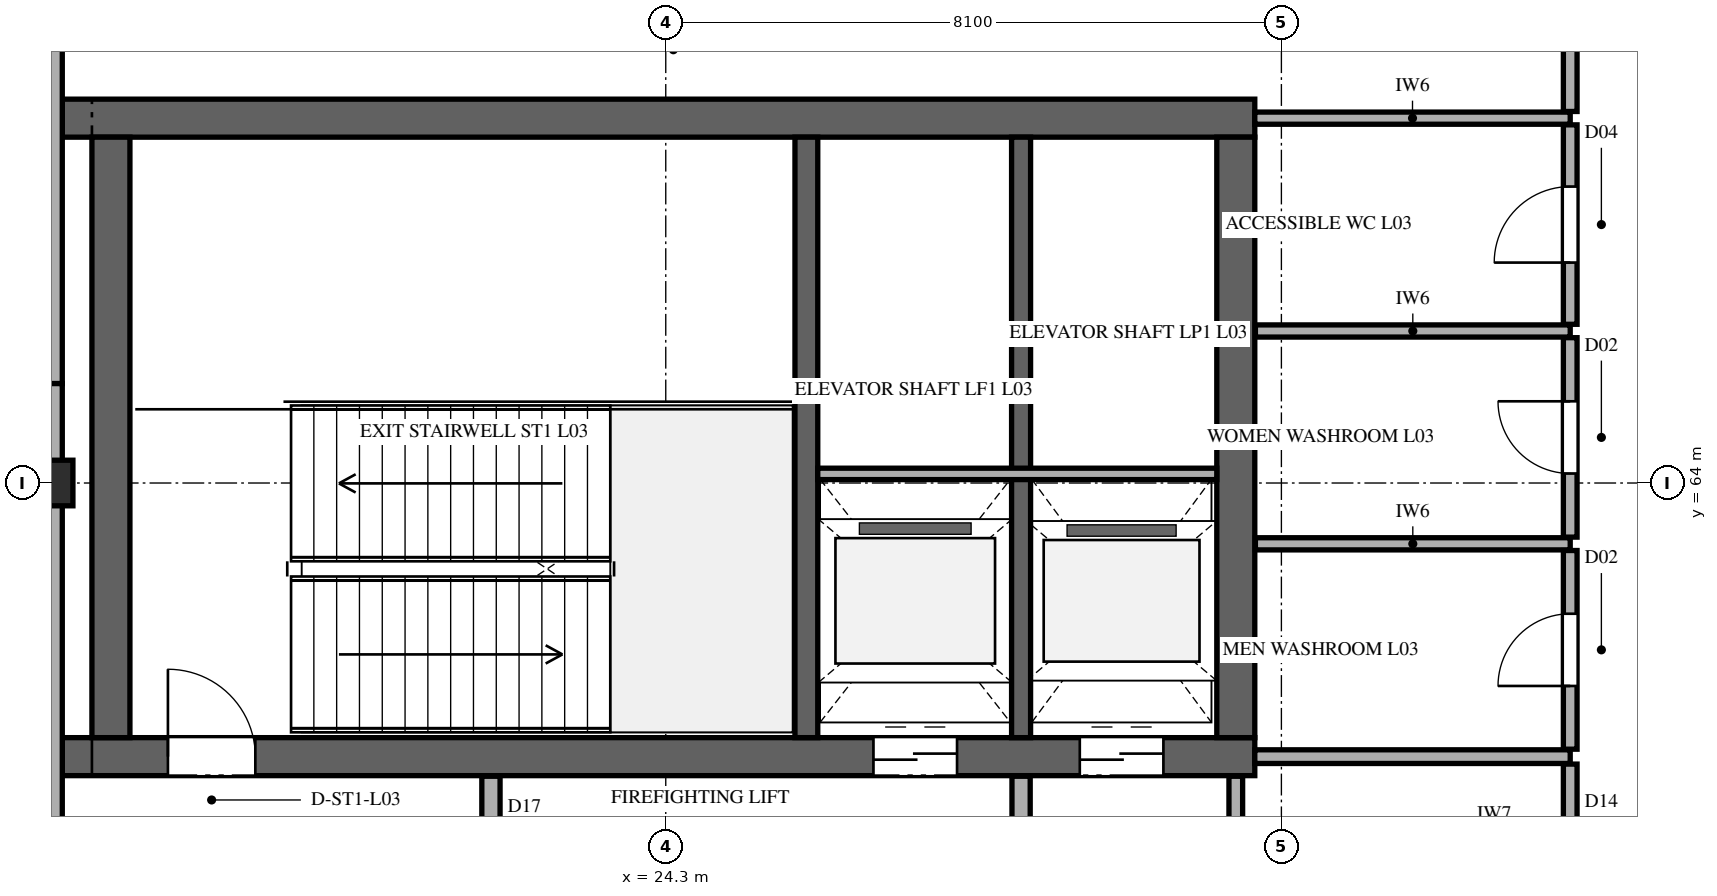
"""IFC4 building model, lengths in metres.
Left out: names, types, materials, properties, quantities, classifications, styles, units other than length and angle.
Written with IfcOpenShell. Run it as: python <this file> out.ifc"""

import sys

from ifc_helpers import new_model, si_unit, direction, frame, frame_2d, origin, origin_2d, place, context, subcontext, project, spatial, rectangle, extrude, element, fill, save


model = new_model("IFC4")
c1 = context("Model", 3, precision=1e-05, world=origin(), true_north=direction((0.0, 1.0)))
c2 = subcontext(c1, "Body", "Model", "MODEL_VIEW")
j1 = project(units=[si_unit("LENGTHUNIT", "METRE"), si_unit("PLANEANGLEUNIT", "RADIAN")], contexts=[c1])
p1 = place(None, origin())
s1 = spatial("IfcSite", under=j1, at=p1, CompositionType="ELEMENT")
p2 = place(p1, origin())
s2 = spatial("IfcBuilding", under=s1, at=p2, CompositionType="ELEMENT")
p3 = place(p2, frame((0.0, 0.0, 14.7)))
s3 = spatial("IfcBuildingStorey", under=s2, at=p3, CompositionType="ELEMENT", Elevation=14.7)
p4 = place(p3, frame((16.36, 60.4, 0.0), z_axis=(0.0, 0.0, 1.0), x_axis=(1.0, 0.0, 0.0)))
e1 = element("IfcWall", 1, at=p4, inside=s3, PredefinedType="SHEAR", context=c2, shape_type="SweptSolid", body=[
    extrude(rectangle(XDim=15.69, YDim=0.5, at=frame_2d((7.845, 0.0))), origin(), (0.0, 0.0, 1.0), 5.1),
])
p5 = place(p4, frame((1.39, 0.0, 0.0)))
e2 = element("IfcOpeningElement", 2, at=p5, cuts=e1, PredefinedType="OPENING", context=c2, shape_type="SweptSolid", body=[
    extrude(rectangle(XDim=1.15, YDim=2.25, at=frame_2d((0.575, 1.125))), frame((0.0, 0.26, 0.0), z_axis=(0.0, -1.0, 0.0), x_axis=(1.0, 0.0, 0.0)), (0.0, 0.0, 1.0), 0.52),
])
p6 = place(p4, frame((10.673, 0.0, 0.0)))
e3 = element("IfcOpeningElement", 3, at=p6, cuts=e1, PredefinedType="OPENING", context=c2, shape_type="SweptSolid", body=[
    extrude(rectangle(XDim=1.1, YDim=2.2, at=frame_2d((0.55, 1.1))), frame((0.0, 0.26, 0.0), z_axis=(0.0, -1.0, 0.0), x_axis=(1.0, 0.0, 0.0)), (0.0, 0.0, 1.0), 0.52),
])
p7 = place(p4, frame((13.387, 0.0, 0.0)))
e4 = element("IfcOpeningElement", 4, at=p7, cuts=e1, PredefinedType="OPENING", context=c2, shape_type="SweptSolid", body=[
    extrude(rectangle(XDim=1.1, YDim=2.2, at=frame_2d((0.55, 1.1))), frame((0.0, 0.26, 0.0), z_axis=(0.0, -1.0, 0.0), x_axis=(1.0, 0.0, 0.0)), (0.0, 0.0, 1.0), 0.52),
])
p8 = place(p3, frame((16.36, 68.8, 0.0), z_axis=(0.0, 0.0, 1.0), x_axis=(1.0, 0.0, 0.0)))
e5 = element("IfcWall", 5, at=p8, inside=s3, PredefinedType="SHEAR", context=c2, shape_type="SweptSolid", body=[
    extrude(rectangle(XDim=15.69, YDim=0.5, at=frame_2d((7.845, 0.0))), origin(), (0.0, 0.0, 1.0), 5.1),
])
for number, where, z_axis, x_axis in (
    (6, (17.0, 60.65, 0.0), (0.0, 0.0, 1.0), (0.0, 1.0, 0.0)),
    (7, (31.8, 60.65, 0.0), (0.0, 0.0, 1.0), (0.0, 1.0, 0.0)),
):
    element("IfcWall", number, at=place(p3, frame(where, z_axis=z_axis, x_axis=x_axis)), inside=s3, PredefinedType="SHEAR", context=c2, shape_type="SweptSolid", body=[
        extrude(rectangle(XDim=7.9, YDim=0.5, at=frame_2d((3.95, 0.0))), origin(), (0.0, 0.0, 1.0), 5.1),
    ])
p9 = place(p3, frame((26.15, 60.65, 0.0), z_axis=(0.0, 0.0, 1.0), x_axis=(0.0, 1.0, 0.0)))
e8 = element("IfcWall", 8, at=p9, inside=s3, PredefinedType="SHEAR", context=c2, shape_type="SweptSolid", body=[
    extrude(rectangle(XDim=7.9, YDim=0.3, at=frame_2d((3.95, 0.0))), origin(), (0.0, 0.0, 1.0), 5.1),
])
p10 = place(p3, frame((28.975, 60.65, 0.0), z_axis=(0.0, 0.0, 1.0), x_axis=(0.0, 1.0, 0.0)))
e9 = element("IfcWall", 9, at=p10, inside=s3, PredefinedType="SHEAR", context=c2, shape_type="SweptSolid", body=[
    extrude(rectangle(XDim=7.9, YDim=0.25, at=frame_2d((3.95, 0.0))), origin(), (0.0, 0.0, 1.0), 5.1),
])
p11 = place(p3, frame((16.2, 64.0, 0.0), z_axis=(0.0, 0.0, 1.0), x_axis=(1.0, 0.0, 0.0)))
e10 = element("IfcColumn", 10, at=p11, inside=s3, PredefinedType="COLUMN", context=c2, shape_type="SweptSolid", body=[
    extrude(rectangle(XDim=0.6, YDim=0.6, at=origin_2d()), origin(), (0.0, 0.0, 1.0), 5.1),
])
p12 = place(p3, frame((16.2, 80.872, 0.0), z_axis=(0.0, 0.0, 1.0), x_axis=(0.0, -1.0, 0.0)))
e11 = element("IfcWall", 11, at=p12, inside=s3, PredefinedType="SOLIDWALL", context=c2, shape_type="SweptSolid", body=[
    extrude(rectangle(XDim=15.564, YDim=0.32, at=frame_2d((7.782, 0.0))), origin(), (0.0, 0.0, 1.0), 4.332),
])
p13 = place(p12, frame((3.6, 0.0, 0.95)))
e12 = element("IfcOpeningElement", 12, at=p13, cuts=e11, PredefinedType="OPENING", context=c2, shape_type="SweptSolid", body=[
    extrude(rectangle(XDim=3.6, YDim=1.8, at=frame_2d((1.8, 0.9))), frame((0.0, 0.17, 0.0), z_axis=(0.0, -1.0, 0.0), x_axis=(1.0, 0.0, 0.0)), (0.0, 0.0, 1.0), 0.34),
])
p14 = place(p3, frame((16.2, 65.308, 0.0), z_axis=(0.0, 0.0, 1.0), x_axis=(0.0, -1.0, 0.0)))
e13 = element("IfcWall", 13, at=p14, inside=s3, PredefinedType="SOLIDWALL", context=c2, shape_type="SweptSolid", body=[
    extrude(rectangle(XDim=15.564, YDim=0.32, at=frame_2d((7.782, 0.0))), origin(), (0.0, 0.0, 1.0), 4.332),
])
p15 = place(p3, frame((26.3, 64.12, 0.0), z_axis=(0.0, 0.0, 1.0), x_axis=(1.0, 0.0, 0.0)))
e14 = element("IfcWall", 14, at=p15, inside=s3, PredefinedType="PARTITIONING", context=c2, shape_type="SweptSolid", body=[
    extrude(rectangle(XDim=5.25, YDim=0.15, at=frame_2d((2.625, 0.0))), origin(), (0.0, 0.0, 1.0), 4.84),
])
p16 = place(p3, frame((32.05, 60.4, 0.0), z_axis=(0.0, 0.0, 1.0), x_axis=(1.0, 0.0, 0.0)))
e15 = element("IfcWall", 15, at=p16, inside=s3, PredefinedType="PARTITIONING", context=c2, shape_type="SweptSolid", body=[
    extrude(rectangle(XDim=4.15, YDim=0.18, at=frame_2d((2.075, 0.0))), origin(), (0.0, 0.0, 1.0), 4.84),
])
for number, where, z_axis, x_axis in (
    (16, (32.058, 63.2, 0.0), (0.0, 0.0, 1.0), (1.0, 0.0, 0.0)),
    (17, (32.058, 66.0, 0.0), (0.0, 0.0, 1.0), (1.0, 0.0, 0.0)),
):
    element("IfcWall", number, at=place(p3, frame(where, z_axis=z_axis, x_axis=x_axis)), inside=s3, PredefinedType="PARTITIONING", context=c2, shape_type="SweptSolid", body=[
        extrude(rectangle(XDim=4.142, YDim=0.16, at=frame_2d((2.071, 0.0))), origin(), (0.0, 0.0, 1.0), 4.84),
    ])
p17 = place(p3, frame((32.05, 68.8, 0.0), z_axis=(0.0, 0.0, 1.0), x_axis=(1.0, 0.0, 0.0)))
e18 = element("IfcWall", 18, at=p17, inside=s3, PredefinedType="PARTITIONING", context=c2, shape_type="SweptSolid", body=[
    extrude(rectangle(XDim=4.15, YDim=0.16, at=frame_2d((2.075, 0.0))), origin(), (0.0, 0.0, 1.0), 4.84),
])
p18 = place(p3, frame((22.0, 56.928, 0.0), z_axis=(0.0, 0.0, 1.0), x_axis=(0.0, 1.0, 0.0)))
e19 = element("IfcWall", 19, at=p18, inside=s3, PredefinedType="PARTITIONING", context=c2, shape_type="SweptSolid", body=[
    extrude(rectangle(XDim=3.214, YDim=0.24, at=frame_2d((1.607, 0.0))), origin(), (0.0, 0.0, 1.0), 4.84),
])
p19 = place(p18, frame((1.107, 0.0, 0.0)))
e20 = element("IfcOpeningElement", 20, at=p19, cuts=e19, PredefinedType="OPENING", context=c2, shape_type="SweptSolid", body=[
    extrude(rectangle(XDim=1.0, YDim=2.2, at=frame_2d((0.5, 1.1))), frame((0.0, 0.13, 0.0), z_axis=(0.0, -1.0, 0.0), x_axis=(1.0, 0.0, 0.0)), (0.0, 0.0, 1.0), 0.26),
])
p20 = place(p3, frame((28.975, 56.928, 0.0), z_axis=(0.0, 0.0, 1.0), x_axis=(0.0, 1.0, 0.0)))
e21 = element("IfcWall", 21, at=p20, inside=s3, PredefinedType="PARTITIONING", context=c2, shape_type="SweptSolid", body=[
    extrude(rectangle(XDim=3.214, YDim=0.24, at=frame_2d((1.607, 0.0))), origin(), (0.0, 0.0, 1.0), 4.84),
])
p21 = place(p3, frame((31.8, 56.898, 0.0), z_axis=(0.0, 0.0, 1.0), x_axis=(0.0, 1.0, 0.0)))
e22 = element("IfcWall", 22, at=p21, inside=s3, PredefinedType="PARTITIONING", context=c2, shape_type="SweptSolid", body=[
    extrude(rectangle(XDim=3.244, YDim=0.18, at=frame_2d((1.622, 0.0))), origin(), (0.0, 0.0, 1.0), 4.84),
])
p22 = place(p3, frame((36.2, 56.898, 0.0), z_axis=(0.0, 0.0, 1.0), x_axis=(0.0, 1.0, 0.0)))
e23 = element("IfcWall", 23, at=p22, inside=s3, PredefinedType="PARTITIONING", context=c2, shape_type="SweptSolid", body=[
    extrude(rectangle(XDim=3.404, YDim=0.18, at=frame_2d((1.702, 0.0))), origin(), (0.0, 0.0, 1.0), 4.84),
])
p23 = place(p22, frame((1.202, 0.0, 0.0)))
e24 = element("IfcOpeningElement", 24, at=p23, cuts=e23, PredefinedType="OPENING", context=c2, shape_type="SweptSolid", body=[
    extrude(rectangle(XDim=1.0, YDim=2.15, at=frame_2d((0.5, 1.075))), frame((0.0, 0.1, 0.0), z_axis=(0.0, -1.0, 0.0), x_axis=(1.0, 0.0, 0.0)), (0.0, 0.0, 1.0), 0.2),
])
p24 = place(p3, frame((36.2, 60.498, 0.0), z_axis=(0.0, 0.0, 1.0), x_axis=(0.0, 1.0, 0.0)))
e25 = element("IfcWall", 25, at=p24, inside=s3, PredefinedType="PARTITIONING", context=c2, shape_type="SweptSolid", body=[
    extrude(rectangle(XDim=2.614, YDim=0.18, at=frame_2d((1.307, 0.0))), origin(), (0.0, 0.0, 1.0), 4.84),
])
p25 = place(p24, frame((0.832, 0.0, 0.0)))
e26 = element("IfcOpeningElement", 26, at=p25, cuts=e25, PredefinedType="OPENING", context=c2, shape_type="SweptSolid", body=[
    extrude(rectangle(XDim=0.95, YDim=2.1, at=frame_2d((0.475, 1.05))), frame((0.0, 0.1, 0.0), z_axis=(0.0, -1.0, 0.0), x_axis=(1.0, 0.0, 0.0)), (0.0, 0.0, 1.0), 0.2),
])
p26 = place(p3, frame((36.2, 63.288, 0.0), z_axis=(0.0, 0.0, 1.0), x_axis=(0.0, 1.0, 0.0)))
e27 = element("IfcWall", 27, at=p26, inside=s3, PredefinedType="PARTITIONING", context=c2, shape_type="SweptSolid", body=[
    extrude(rectangle(XDim=2.624, YDim=0.18, at=frame_2d((1.312, 0.0))), origin(), (0.0, 0.0, 1.0), 4.84),
])
p27 = place(p26, frame((0.837, 0.0, 0.0)))
e28 = element("IfcOpeningElement", 28, at=p27, cuts=e27, PredefinedType="OPENING", context=c2, shape_type="SweptSolid", body=[
    extrude(rectangle(XDim=0.95, YDim=2.1, at=frame_2d((0.475, 1.05))), frame((0.0, 0.1, 0.0), z_axis=(0.0, -1.0, 0.0), x_axis=(1.0, 0.0, 0.0)), (0.0, 0.0, 1.0), 0.2),
])
p28 = place(p3, frame((36.2, 66.088, 0.0), z_axis=(0.0, 0.0, 1.0), x_axis=(0.0, 1.0, 0.0)))
e29 = element("IfcWall", 29, at=p28, inside=s3, PredefinedType="PARTITIONING", context=c2, shape_type="SweptSolid", body=[
    extrude(rectangle(XDim=2.624, YDim=0.18, at=frame_2d((1.312, 0.0))), origin(), (0.0, 0.0, 1.0), 4.84),
])
p29 = place(p28, frame((0.812, 0.0, 0.0)))
e30 = element("IfcOpeningElement", 30, at=p29, cuts=e29, PredefinedType="OPENING", context=c2, shape_type="SweptSolid", body=[
    extrude(rectangle(XDim=1.0, YDim=2.15, at=frame_2d((0.5, 1.075))), frame((0.0, 0.1, 0.0), z_axis=(0.0, -1.0, 0.0), x_axis=(1.0, 0.0, 0.0)), (0.0, 0.0, 1.0), 0.2),
])
p30 = place(p3, frame((36.2, 68.888, 0.0), z_axis=(0.0, 0.0, 1.0), x_axis=(0.0, 1.0, 0.0)))
e31 = element("IfcWall", 31, at=p30, inside=s3, PredefinedType="PARTITIONING", context=c2, shape_type="SweptSolid", body=[
    extrude(rectangle(XDim=14.504, YDim=0.18, at=frame_2d((7.252, 0.0))), origin(), (0.0, 0.0, 1.0), 4.529),
])
p31 = place(p30, frame((6.702, 0.0, 0.0)))
e32 = element("IfcOpeningElement", 32, at=p31, cuts=e31, PredefinedType="OPENING", context=c2, shape_type="SweptSolid", body=[
    extrude(rectangle(XDim=1.1, YDim=2.2, at=frame_2d((0.55, 1.1))), frame((0.0, 0.1, 0.0), z_axis=(0.0, -1.0, 0.0), x_axis=(1.0, 0.0, 0.0)), (0.0, 0.0, 1.0), 0.2),
])
p32 = place(p5, origin())
e33 = element("IfcDoor", 33, at=p32, inside=s3, OperationType="SINGLE_SWING_LEFT", PredefinedType="DOOR", context=c2, shape_type="SweptSolid", body=[
    extrude(rectangle(XDim=1.15, YDim=2.25, at=frame_2d((0.575, 1.125))), frame((0.0, 0.025, 0.0), z_axis=(0.0, -1.0, 0.0), x_axis=(1.0, 0.0, 0.0)), (0.0, 0.0, 1.0), 0.05),
])
fill(e2, e33)
p33 = place(p6, frame((1.1, 0.0, 0.0), z_axis=(0.0, 0.0, 1.0), x_axis=(-1.0, 0.0, 0.0)))
e34 = element("IfcDoor", 34, at=p33, inside=s3, OperationType="DOUBLE_DOOR_SLIDING", PredefinedType="DOOR", context=c2, shape_type="SweptSolid", body=[
    extrude(rectangle(XDim=1.1, YDim=2.2, at=frame_2d((0.55, 1.1))), frame((0.0, 0.025, 0.0), z_axis=(0.0, -1.0, 0.0), x_axis=(1.0, 0.0, 0.0)), (0.0, 0.0, 1.0), 0.05),
])
fill(e3, e34)
p34 = place(p7, frame((1.1, 0.0, 0.0), z_axis=(0.0, 0.0, 1.0), x_axis=(-1.0, 0.0, 0.0)))
e35 = element("IfcDoor", 35, at=p34, inside=s3, OperationType="DOUBLE_DOOR_SLIDING", PredefinedType="DOOR", context=c2, shape_type="SweptSolid", body=[
    extrude(rectangle(XDim=1.1, YDim=2.2, at=frame_2d((0.55, 1.1))), frame((0.0, 0.025, 0.0), z_axis=(0.0, -1.0, 0.0), x_axis=(1.0, 0.0, 0.0)), (0.0, 0.0, 1.0), 0.05),
])
fill(e4, e35)
p35 = place(p25, origin())
e36 = element("IfcDoor", 36, at=p35, inside=s3, OperationType="SINGLE_SWING_LEFT", PredefinedType="DOOR", context=c2, shape_type="SweptSolid", body=[
    extrude(rectangle(XDim=0.95, YDim=2.1, at=frame_2d((0.475, 1.05))), frame((0.0, 0.025, 0.0), z_axis=(0.0, -1.0, 0.0), x_axis=(1.0, 0.0, 0.0)), (0.0, 0.0, 1.0), 0.05),
])
fill(e26, e36)
p36 = place(p27, origin())
e37 = element("IfcDoor", 37, at=p36, inside=s3, OperationType="SINGLE_SWING_RIGHT", PredefinedType="DOOR", context=c2, shape_type="SweptSolid", body=[
    extrude(rectangle(XDim=0.95, YDim=2.1, at=frame_2d((0.475, 1.05))), frame((0.0, 0.025, 0.0), z_axis=(0.0, -1.0, 0.0), x_axis=(1.0, 0.0, 0.0)), (0.0, 0.0, 1.0), 0.05),
])
fill(e28, e37)
p37 = place(p29, origin())
e38 = element("IfcDoor", 38, at=p37, inside=s3, OperationType="SINGLE_SWING_LEFT", PredefinedType="DOOR", context=c2, shape_type="SweptSolid", body=[
    extrude(rectangle(XDim=1.0, YDim=2.15, at=frame_2d((0.5, 1.075))), frame((0.0, 0.025, 0.0), z_axis=(0.0, -1.0, 0.0), x_axis=(1.0, 0.0, 0.0)), (0.0, 0.0, 1.0), 0.05),
])
fill(e30, e38)
save(model, sys.argv[1])
